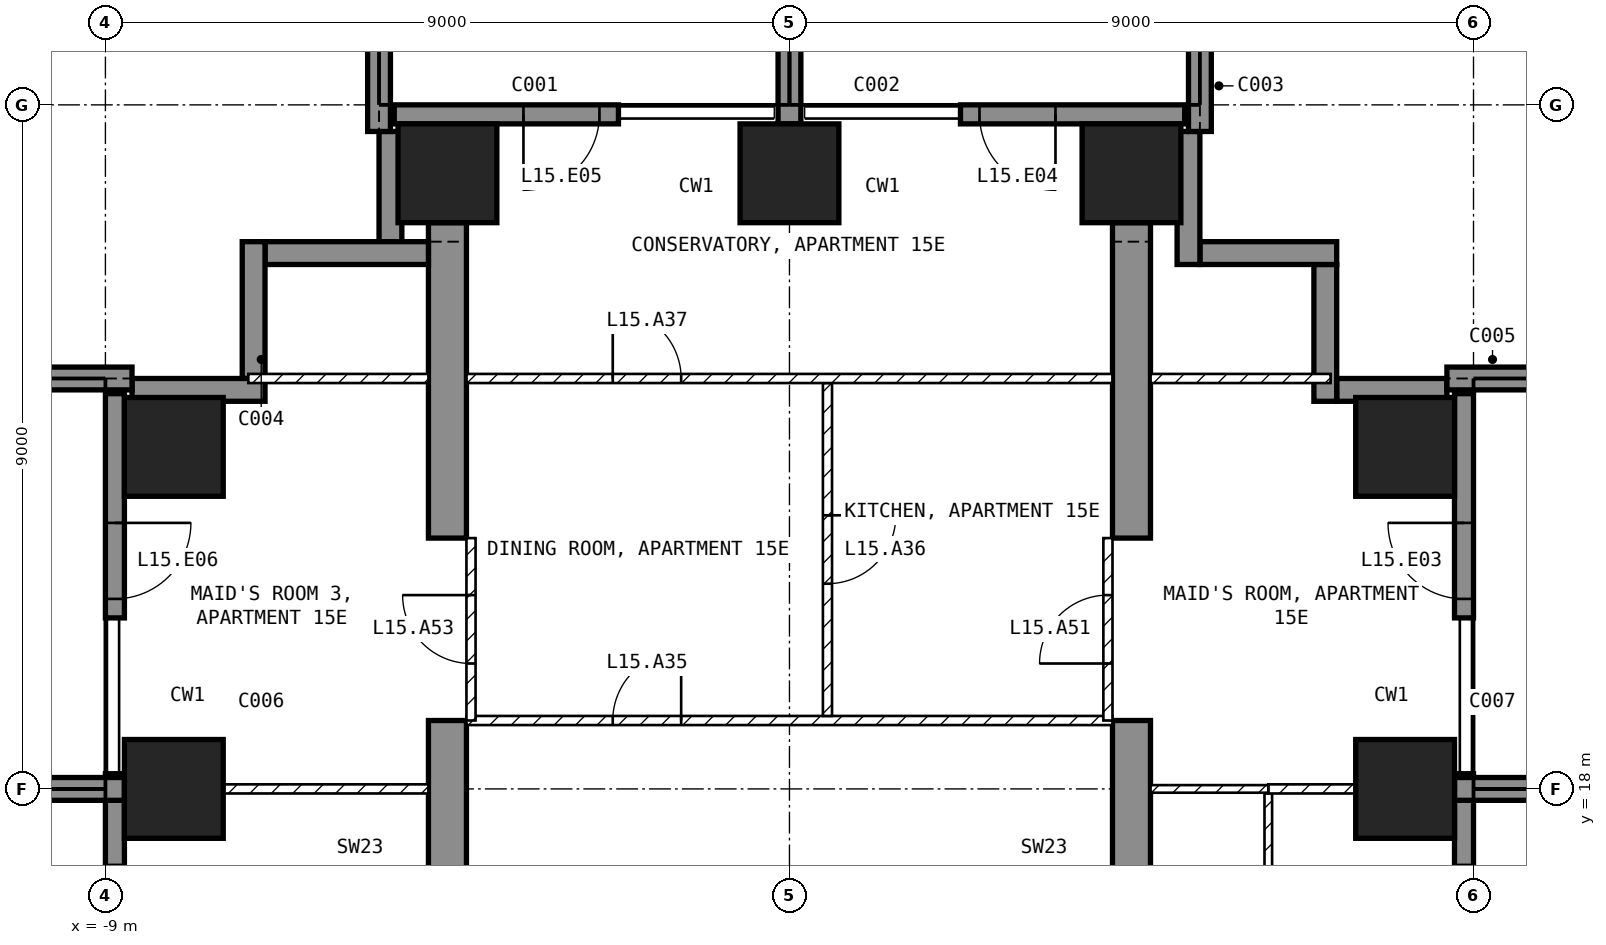
"""IFC4 building model, lengths in metres.
Left out: names, types, materials, properties, quantities, classifications, styles, units other than length and angle.
Written with IfcOpenShell. Run it as: python <this file> out.ifc"""

import sys

from ifc_helpers import new_model, si_unit, direction, frame, frame_2d, origin, origin_2d, place, context, subcontext, project, spatial, polyline, rectangle, outline, extrude, element, fill, save


model = new_model("IFC4")
c1 = context("Model", 3, precision=1e-05, world=origin(), true_north=direction((0.0, 1.0)))
c2 = subcontext(c1, "Body", "Model", "MODEL_VIEW")
j1 = project(units=[si_unit("LENGTHUNIT", "METRE"), si_unit("PLANEANGLEUNIT", "RADIAN")], contexts=[c1])
p1 = place(None, origin())
s1 = spatial("IfcSite", under=j1, at=p1, CompositionType="ELEMENT")
p2 = place(p1, origin())
s2 = spatial("IfcBuilding", under=s1, at=p2, CompositionType="ELEMENT")
p3 = place(p2, frame((0.0, 0.0, 71.5)))
s3 = spatial("IfcBuildingStorey", under=s2, at=p3, CompositionType="ELEMENT", Elevation=71.5)
for number, where, z_axis, x_axis in (
    (1, (-8.1, 18.0, -0.25), (0.0, 0.0, 1.0), (1.0, 0.0, 0.0)),
    (2, (-8.1, 22.5, -0.25), (0.0, 0.0, 1.0), (1.0, 0.0, 0.0)),
    (3, (-4.5, 26.1, -0.25), (0.0, 0.0, 1.0), (1.0, 0.0, 0.0)),
    (4, (0.0, 26.1, -0.25), (0.0, 0.0, 1.0), (1.0, 0.0, 0.0)),
    (5, (4.5, 26.1, -0.25), (0.0, 0.0, 1.0), (1.0, 0.0, 0.0)),
    (6, (8.1, 18.0, -0.25), (0.0, 0.0, 1.0), (1.0, 0.0, 0.0)),
    (7, (8.1, 22.5, -0.25), (0.0, 0.0, 1.0), (1.0, 0.0, 0.0)),
):
    element("IfcColumn", number, at=place(p3, frame(where, z_axis=z_axis, x_axis=x_axis)), inside=s3, PredefinedType="COLUMN", context=c2, shape_type="SweptSolid", body=[
        extrude(rectangle(XDim=1.3, YDim=1.3, at=origin_2d()), origin(), (0.0, 0.0, 1.0), 3.5),
    ])
for number, where, z_axis, x_axis in (
    (8, (-4.75, 9.0, -0.25), (1.0, 0.0, 0.0), (0.0, 1.0, 0.0)),
    (9, (4.25, 9.0, -0.25), (1.0, 0.0, 0.0), (0.0, 1.0, 0.0)),
):
    element("IfcWall", number, at=place(p3, frame(where, z_axis=z_axis, x_axis=x_axis)), inside=s3, PredefinedType="SHEAR", context=c2, shape_type="SweptSolid", body=[
        extrude(outline(polyline([(0.0, 0.0), (2.1, 0.0), (2.1, 2.65), (4.5, 2.65), (4.5, 0.0), (9.9, 0.0), (9.9, 2.65), (12.3, 2.65), (12.3, 0.0), (16.45, 0.0), (16.45, 3.5), (0.0, 3.5), (0.0, 0.0)])), origin(), (0.0, 0.0, 1.0), 0.5),
    ])
p4 = place(p3, frame((8.875, 15.55, 0.0), z_axis=(0.0, 0.0, 1.0), x_axis=(0.0, 1.0, 0.0)))
e10 = element("IfcWall", 10, at=p4, inside=s3, PredefinedType="SOLIDWALL", context=c2, shape_type="SweptSolid", body=[
    extrude(rectangle(XDim=2.65, YDim=0.25, at=frame_2d((1.325, 0.0))), origin(), (0.0, 0.0, 1.0), 3.25),
])
p5 = place(p4, frame((0.25, 0.0, 0.0)))
e11 = element("IfcOpeningElement", 11, at=p5, cuts=e10, PredefinedType="OPENING", context=c2, shape_type="SweptSolid", body=[
    extrude(rectangle(XDim=1.2, YDim=2.4, at=frame_2d((0.6, 1.2))), frame((0.0, 0.135, 0.0), z_axis=(0.0, -1.0, 0.0), x_axis=(1.0, 0.0, 0.0)), (0.0, 0.0, 1.0), 0.27),
])
p6 = place(p3, frame((8.875, 20.25, 0.0), z_axis=(0.0, 0.0, 1.0), x_axis=(0.0, 1.0, 0.0)))
e12 = element("IfcWall", 12, at=p6, inside=s3, PredefinedType="SOLIDWALL", context=c2, shape_type="SweptSolid", body=[
    extrude(rectangle(XDim=2.95, YDim=0.25, at=frame_2d((1.475, 0.0))), origin(), (0.0, 0.0, 1.0), 3.25),
])
p7 = place(p6, frame((0.25, 0.0, 0.0)))
e13 = element("IfcOpeningElement", 13, at=p7, cuts=e12, PredefinedType="OPENING", context=c2, shape_type="SweptSolid", body=[
    extrude(rectangle(XDim=1.0, YDim=2.4, at=frame_2d((0.5, 1.2))), frame((0.0, 0.135, 0.0), z_axis=(0.0, -1.0, 0.0), x_axis=(1.0, 0.0, 0.0)), (0.0, 0.0, 1.0), 0.27),
])
p8 = place(p3, frame((5.2, 26.875, 0.0), z_axis=(0.0, 0.0, 1.0), x_axis=(-1.0, 0.0, 0.0)))
e14 = element("IfcWall", 14, at=p8, inside=s3, PredefinedType="SOLIDWALL", context=c2, shape_type="SweptSolid", body=[
    extrude(rectangle(XDim=2.95, YDim=0.25, at=frame_2d((1.475, 0.0))), origin(), (0.0, 0.0, 1.0), 3.25),
])
p9 = place(p8, frame((1.7, 0.0, 0.0)))
e15 = element("IfcOpeningElement", 15, at=p9, cuts=e14, PredefinedType="OPENING", context=c2, shape_type="SweptSolid", body=[
    extrude(rectangle(XDim=1.0, YDim=2.4, at=frame_2d((0.5, 1.2))), frame((0.0, 0.135, 0.0), z_axis=(0.0, -1.0, 0.0), x_axis=(1.0, 0.0, 0.0)), (0.0, 0.0, 1.0), 0.27),
])
p10 = place(p3, frame((-2.25, 26.875, 0.0), z_axis=(0.0, 0.0, 1.0), x_axis=(-1.0, 0.0, 0.0)))
e16 = element("IfcWall", 16, at=p10, inside=s3, PredefinedType="SOLIDWALL", context=c2, shape_type="SweptSolid", body=[
    extrude(rectangle(XDim=2.95, YDim=0.25, at=frame_2d((1.475, 0.0))), origin(), (0.0, 0.0, 1.0), 3.25),
])
p11 = place(p10, frame((0.25, 0.0, 0.0)))
e17 = element("IfcOpeningElement", 17, at=p11, cuts=e16, PredefinedType="OPENING", context=c2, shape_type="SweptSolid", body=[
    extrude(rectangle(XDim=1.0, YDim=2.4, at=frame_2d((0.5, 1.2))), frame((0.0, 0.135, 0.0), z_axis=(0.0, -1.0, 0.0), x_axis=(1.0, 0.0, 0.0)), (0.0, 0.0, 1.0), 0.27),
])
p12 = place(p3, frame((-8.875, 23.2, 0.0), z_axis=(0.0, 0.0, 1.0), x_axis=(0.0, -1.0, 0.0)))
e18 = element("IfcWall", 18, at=p12, inside=s3, PredefinedType="SOLIDWALL", context=c2, shape_type="SweptSolid", body=[
    extrude(rectangle(XDim=2.95, YDim=0.25, at=frame_2d((1.475, 0.0))), origin(), (0.0, 0.0, 1.0), 3.25),
])
p13 = place(p12, frame((1.7, 0.0, 0.0)))
e19 = element("IfcOpeningElement", 19, at=p13, cuts=e18, PredefinedType="OPENING", context=c2, shape_type="SweptSolid", body=[
    extrude(rectangle(XDim=1.0, YDim=2.4, at=frame_2d((0.5, 1.2))), frame((0.0, 0.135, 0.0), z_axis=(0.0, -1.0, 0.0), x_axis=(1.0, 0.0, 0.0)), (0.0, 0.0, 1.0), 0.27),
])
p14 = place(p3, frame((-8.875, 18.2, 0.0), z_axis=(0.0, 0.0, 1.0), x_axis=(0.0, -1.0, 0.0)))
e20 = element("IfcWall", 20, at=p14, inside=s3, PredefinedType="SOLIDWALL", context=c2, shape_type="SweptSolid", body=[
    extrude(rectangle(XDim=2.65, YDim=0.25, at=frame_2d((1.325, 0.0))), origin(), (0.0, 0.0, 1.0), 3.25),
])
p15 = place(p14, frame((1.2, 0.0, 0.0)))
e21 = element("IfcOpeningElement", 21, at=p15, cuts=e20, PredefinedType="OPENING", context=c2, shape_type="SweptSolid", body=[
    extrude(rectangle(XDim=1.2, YDim=2.4, at=frame_2d((0.6, 1.2))), frame((0.0, 0.135, 0.0), z_axis=(0.0, -1.0, 0.0), x_axis=(1.0, 0.0, 0.0)), (0.0, 0.0, 1.0), 0.27),
])
p16 = place(p3, frame((8.65, 23.25, 0.0), z_axis=(0.0, 0.0, 1.0), x_axis=(-1.0, 0.0, 0.0)))
e22 = element("IfcWall", 22, at=p16, inside=s3, PredefinedType="SOLIDWALL", context=c2, shape_type="SweptSolid", body=[
    extrude(rectangle(XDim=1.45, YDim=0.3, at=frame_2d((0.725, 0.0))), origin(), (0.0, 0.0, 1.0), 3.25),
])
p17 = place(p3, frame((7.05, 23.1, 0.0), z_axis=(0.0, 0.0, 1.0), x_axis=(0.0, 1.0, 0.0)))
e23 = element("IfcWall", 23, at=p17, inside=s3, PredefinedType="SOLIDWALL", context=c2, shape_type="SweptSolid", body=[
    extrude(rectangle(XDim=1.8, YDim=0.3, at=frame_2d((0.9, 0.0))), origin(), (0.0, 0.0, 1.0), 3.25),
])
p18 = place(p3, frame((7.2, 25.05, 0.0), z_axis=(0.0, 0.0, 1.0), x_axis=(-1.0, 0.0, 0.0)))
e24 = element("IfcWall", 24, at=p18, inside=s3, PredefinedType="SOLIDWALL", context=c2, shape_type="SweptSolid", body=[
    extrude(rectangle(XDim=1.8, YDim=0.3, at=frame_2d((0.9, 0.0))), origin(), (0.0, 0.0, 1.0), 3.25),
])
p19 = place(p3, frame((5.25, 24.9, 0.0), z_axis=(0.0, 0.0, 1.0), x_axis=(0.0, 1.0, 0.0)))
e25 = element("IfcWall", 25, at=p19, inside=s3, PredefinedType="SOLIDWALL", context=c2, shape_type="SweptSolid", body=[
    extrude(rectangle(XDim=1.75, YDim=0.3, at=frame_2d((0.875, 0.0))), origin(), (0.0, 0.0, 1.0), 3.25),
])
p20 = place(p3, frame((-5.25, 26.65, 0.0), z_axis=(0.0, 0.0, 1.0), x_axis=(0.0, -1.0, 0.0)))
e26 = element("IfcWall", 26, at=p20, inside=s3, PredefinedType="SOLIDWALL", context=c2, shape_type="SweptSolid", body=[
    extrude(rectangle(XDim=1.45, YDim=0.3, at=frame_2d((0.725, 0.0))), origin(), (0.0, 0.0, 1.0), 3.25),
])
p21 = place(p3, frame((-4.75, 25.05, 0.0), z_axis=(0.0, 0.0, 1.0), x_axis=(-1.0, 0.0, 0.0)))
e27 = element("IfcWall", 27, at=p21, inside=s3, PredefinedType="SOLIDWALL", context=c2, shape_type="SweptSolid", body=[
    extrude(rectangle(XDim=2.15, YDim=0.3, at=frame_2d((1.075, 0.0))), origin(), (0.0, 0.0, 1.0), 3.25),
])
p22 = place(p3, frame((-7.05, 25.2, 0.0), z_axis=(0.0, 0.0, 1.0), x_axis=(0.0, -1.0, 0.0)))
e28 = element("IfcWall", 28, at=p22, inside=s3, PredefinedType="SOLIDWALL", context=c2, shape_type="SweptSolid", body=[
    extrude(rectangle(XDim=1.8, YDim=0.3, at=frame_2d((0.9, 0.0))), origin(), (0.0, 0.0, 1.0), 3.25),
])
p23 = place(p3, frame((-6.9, 23.25, 0.0), z_axis=(0.0, 0.0, 1.0), x_axis=(-1.0, 0.0, 0.0)))
e29 = element("IfcWall", 29, at=p23, inside=s3, PredefinedType="SOLIDWALL", context=c2, shape_type="SweptSolid", body=[
    extrude(rectangle(XDim=1.75, YDim=0.3, at=frame_2d((0.875, 0.0))), origin(), (0.0, 0.0, 1.0), 3.25),
])
p24 = place(p3, frame((-8.75, 18.0, 0.0), z_axis=(0.0, 0.0, 1.0), x_axis=(-1.0, 0.0, 0.0)))
e30 = element("IfcWall", 30, at=p24, inside=s3, PredefinedType="SOLIDWALL", context=c2, shape_type="SweptSolid", body=[
    extrude(rectangle(XDim=2.95, YDim=0.3, at=frame_2d((1.475, 0.0))), origin(), (0.0, 0.0, 1.0), 3.25),
])
for number, where, z_axis, x_axis in (
    (31, (-8.65, 23.4, 0.0), (0.0, 0.0, 1.0), (-1.0, 0.0, 0.0)),
    (32, (-5.4, 26.65, 0.0), (0.0, 0.0, 1.0), (0.0, 1.0, 0.0)),
):
    element("IfcWall", number, at=place(p3, frame(where, z_axis=z_axis, x_axis=x_axis)), inside=s3, PredefinedType="SOLIDWALL", context=c2, shape_type="SweptSolid", body=[
        extrude(rectangle(XDim=3.05, YDim=0.3, at=frame_2d((1.525, 0.0))), origin(), (0.0, 0.0, 1.0), 3.25),
    ])
p25 = place(p3, frame((0.0, 26.75, 0.0), z_axis=(0.0, 0.0, 1.0), x_axis=(0.0, 1.0, 0.0)))
e33 = element("IfcWall", 33, at=p25, inside=s3, PredefinedType="SOLIDWALL", context=c2, shape_type="SweptSolid", body=[
    extrude(rectangle(XDim=2.95, YDim=0.3, at=frame_2d((1.475, 0.0))), origin(), (0.0, 0.0, 1.0), 3.25),
])
p26 = place(p3, frame((5.4, 26.65, 0.0), z_axis=(0.0, 0.0, 1.0), x_axis=(0.0, 1.0, 0.0)))
e34 = element("IfcWall", 34, at=p26, inside=s3, PredefinedType="SOLIDWALL", context=c2, shape_type="SweptSolid", body=[
    extrude(rectangle(XDim=3.05, YDim=0.3, at=frame_2d((1.525, 0.0))), origin(), (0.0, 0.0, 1.0), 3.25),
])
p27 = place(p3, frame((8.75, 18.0, 0.0), z_axis=(0.0, 0.0, 1.0), x_axis=(1.0, 0.0, 0.0)))
e35 = element("IfcWall", 35, at=p27, inside=s3, PredefinedType="SOLIDWALL", context=c2, shape_type="SweptSolid", body=[
    extrude(rectangle(XDim=2.95, YDim=0.3, at=frame_2d((1.475, 0.0))), origin(), (0.0, 0.0, 1.0), 3.25),
])
p28 = place(p3, frame((8.65, 23.4, 0.0), z_axis=(0.0, 0.0, 1.0), x_axis=(1.0, 0.0, 0.0)))
e36 = element("IfcWall", 36, at=p28, inside=s3, PredefinedType="SOLIDWALL", context=c2, shape_type="SweptSolid", body=[
    extrude(rectangle(XDim=3.05, YDim=0.3, at=frame_2d((1.525, 0.0))), origin(), (0.0, 0.0, 1.0), 3.25),
])
p29 = place(p3, frame((-4.25, 18.9, 0.0), z_axis=(0.0, 0.0, 1.0), x_axis=(1.0, 0.0, 0.0)))
e37 = element("IfcWall", 37, at=p29, inside=s3, PredefinedType="PARTITIONING", context=c2, shape_type="SweptSolid", body=[
    extrude(rectangle(XDim=8.5, YDim=0.12, at=frame_2d((4.25, 0.0))), origin(), (0.0, 0.0, 1.0), 3.25),
])
p30 = place(p29, frame((1.925, 0.0, 0.0)))
e38 = element("IfcOpeningElement", 38, at=p30, cuts=e37, PredefinedType="OPENING", context=c2, shape_type="SweptSolid", body=[
    extrude(rectangle(XDim=0.9, YDim=2.1, at=frame_2d((0.45, 1.05))), frame((0.0, 0.07, 0.0), z_axis=(0.0, -1.0, 0.0), x_axis=(1.0, 0.0, 0.0)), (0.0, 0.0, 1.0), 0.14),
])
p31 = place(p3, frame((0.5, 23.34, 0.0), z_axis=(0.0, 0.0, 1.0), x_axis=(0.0, -1.0, 0.0)))
e39 = element("IfcWall", 39, at=p31, inside=s3, PredefinedType="PARTITIONING", context=c2, shape_type="SweptSolid", body=[
    extrude(rectangle(XDim=4.38, YDim=0.12, at=frame_2d((2.19, 0.0))), origin(), (0.0, 0.0, 1.0), 3.25),
])
p32 = place(p31, frame((1.74, 0.0, 0.0)))
e40 = element("IfcOpeningElement", 40, at=p32, cuts=e39, PredefinedType="OPENING", context=c2, shape_type="SweptSolid", body=[
    extrude(rectangle(XDim=0.9, YDim=2.1, at=frame_2d((0.45, 1.05))), frame((0.0, 0.07, 0.0), z_axis=(0.0, -1.0, 0.0), x_axis=(1.0, 0.0, 0.0)), (0.0, 0.0, 1.0), 0.14),
])
p33 = place(p3, frame((-4.25, 23.4, 0.0), z_axis=(0.0, 0.0, 1.0), x_axis=(1.0, 0.0, 0.0)))
e41 = element("IfcWall", 41, at=p33, inside=s3, PredefinedType="PARTITIONING", context=c2, shape_type="SweptSolid", body=[
    extrude(rectangle(XDim=8.5, YDim=0.12, at=frame_2d((4.25, 0.0))), origin(), (0.0, 0.0, 1.0), 3.25),
])
p34 = place(p33, frame((1.925, 0.0, 0.0)))
e42 = element("IfcOpeningElement", 42, at=p34, cuts=e41, PredefinedType="OPENING", context=c2, shape_type="SweptSolid", body=[
    extrude(rectangle(XDim=0.9, YDim=2.1, at=frame_2d((0.45, 1.05))), frame((0.0, 0.07, 0.0), z_axis=(0.0, -1.0, 0.0), x_axis=(1.0, 0.0, 0.0)), (0.0, 0.0, 1.0), 0.14),
])
p35 = place(p3, frame((6.3, 14.45, 0.0), z_axis=(0.0, 0.0, 1.0), x_axis=(0.0, 1.0, 0.0)))
e43 = element("IfcWall", 43, at=p35, inside=s3, PredefinedType="PARTITIONING", context=c2, shape_type="SweptSolid", body=[
    extrude(rectangle(XDim=3.49, YDim=0.1, at=frame_2d((1.745, 0.0))), origin(), (0.0, 0.0, 1.0), 3.25),
])
p36 = place(p3, frame((6.3, 18.0, 0.0), z_axis=(0.0, 0.0, 1.0), x_axis=(1.0, 0.0, 0.0)))
e44 = element("IfcWall", 44, at=p36, inside=s3, PredefinedType="PARTITIONING", context=c2, shape_type="SweptSolid", body=[
    extrude(rectangle(XDim=1.15, YDim=0.12, at=frame_2d((0.575, 0.0))), origin(), (0.0, 0.0, 1.0), 2.346),
])
p37 = place(p3, frame((4.75, 18.0, 0.0), z_axis=(0.0, 0.0, 1.0), x_axis=(1.0, 0.0, 0.0)))
e45 = element("IfcWall", 45, at=p37, inside=s3, PredefinedType="PARTITIONING", context=c2, shape_type="SweptSolid", body=[
    extrude(rectangle(XDim=1.55, YDim=0.1, at=frame_2d((0.775, 0.0))), origin(), (0.0, 0.0, 1.0), 2.346),
])
p38 = place(p3, frame((4.75, 23.4, 0.0), z_axis=(0.0, 0.0, 1.0), x_axis=(1.0, 0.0, 0.0)))
e46 = element("IfcWall", 46, at=p38, inside=s3, PredefinedType="PARTITIONING", context=c2, shape_type="SweptSolid", body=[
    extrude(rectangle(XDim=2.37, YDim=0.12, at=frame_2d((1.185, 0.0))), origin(), (0.0, 0.0, 1.0), 3.25),
])
p39 = place(p3, frame((-7.45, 18.0, 0.0), z_axis=(0.0, 0.0, 1.0), x_axis=(1.0, 0.0, 0.0)))
e47 = element("IfcWall", 47, at=p39, inside=s3, PredefinedType="PARTITIONING", context=c2, shape_type="SweptSolid", body=[
    extrude(rectangle(XDim=2.7, YDim=0.12, at=frame_2d((1.35, 0.0))), origin(), (0.0, 0.0, 1.0), 2.346),
])
p40 = place(p3, frame((-7.12, 23.4, 0.0), z_axis=(0.0, 0.0, 1.0), x_axis=(1.0, 0.0, 0.0)))
e48 = element("IfcWall", 48, at=p40, inside=s3, PredefinedType="PARTITIONING", context=c2, shape_type="SweptSolid", body=[
    extrude(rectangle(XDim=2.37, YDim=0.12, at=frame_2d((1.185, 0.0))), origin(), (0.0, 0.0, 1.0), 3.25),
])
p41 = place(p3, frame((4.19, 18.9, 0.0), z_axis=(0.0, 0.0, 1.0), x_axis=(0.0, 1.0, 0.0)))
e49 = element("IfcWall", 49, at=p41, inside=s3, PredefinedType="PARTITIONING", context=c2, shape_type="SweptSolid", body=[
    extrude(rectangle(XDim=2.4, YDim=0.12, at=frame_2d((1.2, 0.0))), origin(), (0.0, 0.0, 1.0), 2.4),
])
p42 = place(p41, frame((0.75, 0.0, 0.0)))
e50 = element("IfcOpeningElement", 50, at=p42, cuts=e49, PredefinedType="OPENING", context=c2, shape_type="SweptSolid", body=[
    extrude(rectangle(XDim=0.9, YDim=2.1, at=frame_2d((0.45, 1.05))), frame((0.0, 0.07, 0.0), z_axis=(0.0, -1.0, 0.0), x_axis=(1.0, 0.0, 0.0)), (0.0, 0.0, 1.0), 0.14),
])
p43 = place(p3, frame((-4.19, 18.9, 0.0), z_axis=(0.0, 0.0, 1.0), x_axis=(0.0, 1.0, 0.0)))
e51 = element("IfcWall", 51, at=p43, inside=s3, PredefinedType="PARTITIONING", context=c2, shape_type="SweptSolid", body=[
    extrude(rectangle(XDim=2.4, YDim=0.12, at=frame_2d((1.2, 0.0))), origin(), (0.0, 0.0, 1.0), 2.4),
])
p44 = place(p43, frame((0.75, 0.0, 0.0)))
e52 = element("IfcOpeningElement", 52, at=p44, cuts=e51, PredefinedType="OPENING", context=c2, shape_type="SweptSolid", body=[
    extrude(rectangle(XDim=0.9, YDim=2.1, at=frame_2d((0.45, 1.05))), frame((0.0, 0.07, 0.0), z_axis=(0.0, -1.0, 0.0), x_axis=(1.0, 0.0, 0.0)), (0.0, 0.0, 1.0), 0.14),
])
p45 = place(p5, origin())
e53 = element("IfcDoor", 53, at=p45, inside=s3, OperationType="SINGLE_SWING_LEFT", PredefinedType="DOOR", context=c2, shape_type="SweptSolid", body=[
    extrude(rectangle(XDim=1.2, YDim=2.4, at=frame_2d((0.6, 1.2))), frame((0.0, 0.025, 0.0), z_axis=(0.0, -1.0, 0.0), x_axis=(1.0, 0.0, 0.0)), (0.0, 0.0, 1.0), 0.05),
])
fill(e11, e53)
p46 = place(p7, origin())
e54 = element("IfcDoor", 54, at=p46, inside=s3, OperationType="SINGLE_SWING_RIGHT", PredefinedType="DOOR", context=c2, shape_type="SweptSolid", body=[
    extrude(rectangle(XDim=1.0, YDim=2.4, at=frame_2d((0.5, 1.2))), frame((0.0, 0.025, 0.0), z_axis=(0.0, -1.0, 0.0), x_axis=(1.0, 0.0, 0.0)), (0.0, 0.0, 1.0), 0.05),
])
fill(e13, e54)
p47 = place(p9, origin())
e55 = element("IfcDoor", 55, at=p47, inside=s3, OperationType="SINGLE_SWING_LEFT", PredefinedType="DOOR", context=c2, shape_type="SweptSolid", body=[
    extrude(rectangle(XDim=1.0, YDim=2.4, at=frame_2d((0.5, 1.2))), frame((0.0, 0.025, 0.0), z_axis=(0.0, -1.0, 0.0), x_axis=(1.0, 0.0, 0.0)), (0.0, 0.0, 1.0), 0.05),
])
fill(e15, e55)
p48 = place(p11, origin())
e56 = element("IfcDoor", 56, at=p48, inside=s3, OperationType="SINGLE_SWING_RIGHT", PredefinedType="DOOR", context=c2, shape_type="SweptSolid", body=[
    extrude(rectangle(XDim=1.0, YDim=2.4, at=frame_2d((0.5, 1.2))), frame((0.0, 0.025, 0.0), z_axis=(0.0, -1.0, 0.0), x_axis=(1.0, 0.0, 0.0)), (0.0, 0.0, 1.0), 0.05),
])
fill(e17, e56)
p49 = place(p13, origin())
e57 = element("IfcDoor", 57, at=p49, inside=s3, OperationType="SINGLE_SWING_LEFT", PredefinedType="DOOR", context=c2, shape_type="SweptSolid", body=[
    extrude(rectangle(XDim=1.0, YDim=2.4, at=frame_2d((0.5, 1.2))), frame((0.0, 0.025, 0.0), z_axis=(0.0, -1.0, 0.0), x_axis=(1.0, 0.0, 0.0)), (0.0, 0.0, 1.0), 0.05),
])
fill(e19, e57)
p50 = place(p30, origin())
e58 = element("IfcDoor", 58, at=p50, inside=s3, OperationType="SINGLE_SWING_RIGHT", PredefinedType="DOOR", context=c2, shape_type="SweptSolid", body=[
    extrude(rectangle(XDim=0.9, YDim=2.1, at=frame_2d((0.45, 1.05))), frame((0.0, 0.025, 0.0), z_axis=(0.0, -1.0, 0.0), x_axis=(1.0, 0.0, 0.0)), (0.0, 0.0, 1.0), 0.05),
])
fill(e38, e58)
p51 = place(p32, origin())
e59 = element("IfcDoor", 59, at=p51, inside=s3, OperationType="SINGLE_SWING_LEFT", PredefinedType="DOOR", context=c2, shape_type="SweptSolid", body=[
    extrude(rectangle(XDim=0.9, YDim=2.1, at=frame_2d((0.45, 1.05))), frame((0.0, 0.025, 0.0), z_axis=(0.0, -1.0, 0.0), x_axis=(1.0, 0.0, 0.0)), (0.0, 0.0, 1.0), 0.05),
])
fill(e40, e59)
p52 = place(p34, origin())
e60 = element("IfcDoor", 60, at=p52, inside=s3, OperationType="SINGLE_SWING_LEFT", PredefinedType="DOOR", context=c2, shape_type="SweptSolid", body=[
    extrude(rectangle(XDim=0.9, YDim=2.1, at=frame_2d((0.45, 1.05))), frame((0.0, 0.025, 0.0), z_axis=(0.0, -1.0, 0.0), x_axis=(1.0, 0.0, 0.0)), (0.0, 0.0, 1.0), 0.05),
])
fill(e42, e60)
p53 = place(p42, origin())
e61 = element("IfcDoor", 61, at=p53, inside=s3, OperationType="SINGLE_SWING_LEFT", PredefinedType="DOOR", context=c2, shape_type="SweptSolid", body=[
    extrude(rectangle(XDim=0.9, YDim=2.1, at=frame_2d((0.45, 1.05))), frame((0.0, 0.025, 0.0), z_axis=(0.0, -1.0, 0.0), x_axis=(1.0, 0.0, 0.0)), (0.0, 0.0, 1.0), 0.05),
])
fill(e50, e61)
p54 = place(p44, origin())
e62 = element("IfcDoor", 62, at=p54, inside=s3, OperationType="SINGLE_SWING_RIGHT", PredefinedType="DOOR", context=c2, shape_type="SweptSolid", body=[
    extrude(rectangle(XDim=0.9, YDim=2.1, at=frame_2d((0.45, 1.05))), frame((0.0, 0.025, 0.0), z_axis=(0.0, -1.0, 0.0), x_axis=(1.0, 0.0, 0.0)), (0.0, 0.0, 1.0), 0.05),
])
fill(e52, e62)
save(model, sys.argv[1])
